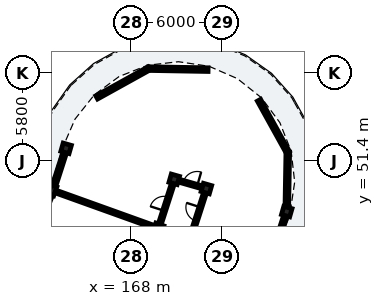
"""IFC4 building model, lengths in metres.
Left out: names, types, materials, properties, quantities, classifications, styles, units other than length and angle.
Written with IfcOpenShell. Run it as: python <this file> out.ifc"""

import sys

from ifc_helpers import new_model, si_unit, direction, frame, frame_2d, origin, origin_2d, place, context, subcontext, project, spatial, rectangle, extrude, element, fill, save


model = new_model("IFC4")
c1 = context("Model", 3, precision=1e-05, world=origin(), true_north=direction((0.0, 1.0)))
c2 = subcontext(c1, "Body", "Model", "MODEL_VIEW")
j1 = project(units=[si_unit("LENGTHUNIT", "METRE"), si_unit("PLANEANGLEUNIT", "RADIAN")], contexts=[c1])
p1 = place(None, origin())
s1 = spatial("IfcSite", under=j1, at=p1, CompositionType="ELEMENT")
p2 = place(p1, origin())
s2 = spatial("IfcBuilding", under=s1, at=p2, CompositionType="ELEMENT")
p3 = place(p2, frame((0.0, 0.0, 15.56)))
s3 = spatial("IfcBuildingStorey", under=s2, at=p3, CompositionType="ELEMENT", Elevation=15.56)
p4 = place(p3, frame((162.835, 49.479, 0.0), z_axis=(0.0, 0.0, 1.0), x_axis=(0.941176015256, -0.337916718003, 0.0)))
e1 = element("IfcColumn", 1, at=p4, inside=s3, PredefinedType="PILASTER", context=c2, shape_type="SweptSolid", body=[
    extrude(rectangle(XDim=0.38, YDim=0.62, at=origin_2d()), origin(), (0.0, 0.0, 1.0), 3.11),
])
for number, where, z_axis, x_axis in (
    (2, (169.8, 46.979, 0.0), (0.0, 0.0, 1.0), (0.941, -0.338, 0.0)),
    (3, (163.728, 52.248, 0.0), (0.0, 0.0, 1.0), (0.961, -0.276, 0.0)),
    (4, (170.841, 50.208, 0.0), (0.0, 0.0, 1.0), (0.961, -0.276, 0.0)),
    (5, (172.956, 49.602, 0.0), (0.0, 0.0, 1.0), (0.961, -0.276, 0.0)),
    (6, (178.243, 48.086, 0.0), (0.0, 0.0, 1.0), (0.961, -0.276, 0.0)),
):
    element("IfcColumn", number, at=place(p3, frame(where, z_axis=z_axis, x_axis=x_axis)), inside=s3, PredefinedType="COLUMN", context=c2, shape_type="SweptSolid", body=[
        extrude(rectangle(XDim=0.56, YDim=0.56, at=origin_2d()), origin(), (0.0, 0.0, 1.0), 3.11),
    ])
p5 = place(p3, frame((161.855, 47.008, 0.0), z_axis=(0.0, 0.0, 1.0), x_axis=(0.368558756085, 0.9296044553, 0.0)))
e7 = element("IfcWall", 7, at=p5, inside=s3, PredefinedType="SOLIDWALL", context=c2, shape_type="SweptSolid", body=[
    extrude(rectangle(XDim=2.499, YDim=0.24, at=frame_2d((1.249, 0.0))), origin(), (0.0, 0.0, 1.0), 2.355),
])
p6 = place(p5, frame((0.76, 0.0, 0.0)))
e8 = element("IfcOpeningElement", 8, at=p6, cuts=e7, PredefinedType="OPENING", context=c2, shape_type="SweptSolid", body=[
    extrude(rectangle(XDim=0.98, YDim=2.12, at=frame_2d((0.49, 1.06))), frame((0.0, 0.13, 0.0), z_axis=(0.0, -1.0, 0.0), x_axis=(1.0, 0.0, 0.0)), (0.0, 0.0, 1.0), 0.26),
])
p7 = place(p3, frame((177.096, 44.529, 0.0), z_axis=(0.0, 0.0, 1.0), x_axis=(0.306949591136, 0.951725773793, 0.0)))
e9 = element("IfcWall", 9, at=p7, inside=s3, PredefinedType="SOLIDWALL", context=c2, shape_type="SweptSolid", body=[
    extrude(rectangle(XDim=3.487, YDim=0.24, at=frame_2d((1.743, 0.0))), origin(), (0.0, 0.0, 1.0), 2.355),
])
p8 = place(p7, frame((1.003, 0.0, 0.55)))
e10 = element("IfcOpeningElement", 10, at=p8, cuts=e9, PredefinedType="OPENING", context=c2, shape_type="SweptSolid", body=[
    extrude(rectangle(XDim=1.48, YDim=1.46, at=frame_2d((0.74, 0.73))), frame((0.0, 0.13, 0.0), z_axis=(0.0, -1.0, 0.0), x_axis=(1.0, 0.0, 0.0)), (0.0, 0.0, 1.0), 0.26),
])
p9 = place(p3, frame((162.884, 49.632, 0.0), z_axis=(0.0, 0.0, 1.0), x_axis=(0.306979942778, 0.951715984279, 0.0)))
e11 = element("IfcWall", 11, at=p9, inside=s3, PredefinedType="SOLIDWALL", context=c2, shape_type="SweptSolid", body=[
    extrude(rectangle(XDim=2.499, YDim=0.24, at=frame_2d((1.25, 0.0))), origin(), (0.0, 0.0, 1.0), 2.355),
])
p10 = place(p9, frame((0.369, 0.0, 0.35)))
e12 = element("IfcOpeningElement", 12, at=p10, cuts=e11, PredefinedType="OPENING", context=c2, shape_type="SweptSolid", body=[
    extrude(rectangle(XDim=1.76, YDim=1.635, at=frame_2d((0.88, 0.817))), frame((0.0, 0.13, 0.0), z_axis=(0.0, -1.0, 0.0), x_axis=(1.0, 0.0, 0.0)), (0.0, 0.0, 1.0), 0.26),
])
p11 = place(p3, frame((165.741, 55.598, 0.0), z_axis=(0.0, 0.0, 1.0), x_axis=(0.874616555828, 0.48481530532, 0.0)))
e13 = element("IfcWall", 13, at=p11, inside=s3, PredefinedType="SOLIDWALL", context=c2, shape_type="SweptSolid", body=[
    extrude(rectangle(XDim=3.908, YDim=0.24, at=frame_2d((1.954, 0.0))), origin(), (0.0, 0.0, 1.0), 2.355),
])
p12 = place(p11, frame((0.979, 0.0, 0.4)))
e14 = element("IfcOpeningElement", 14, at=p12, cuts=e13, PredefinedType="OPENING", context=c2, shape_type="SweptSolid", body=[
    extrude(rectangle(XDim=1.95, YDim=1.78, at=frame_2d((0.975, 0.89))), frame((0.0, 0.13, 0.0), z_axis=(0.0, -1.0, 0.0), x_axis=(1.0, 0.0, 0.0)), (0.0, 0.0, 1.0), 0.26),
])
p13 = place(p3, frame((169.159, 57.493, 0.0), z_axis=(0.0, 0.0, 1.0), x_axis=(0.999847005776, -0.017491856396, 0.0)))
e15 = element("IfcWall", 15, at=p13, inside=s3, PredefinedType="SOLIDWALL", context=c2, shape_type="SweptSolid", body=[
    extrude(rectangle(XDim=3.908, YDim=0.24, at=frame_2d((1.954, 0.0))), origin(), (0.0, 0.0, 1.0), 2.355),
])
p14 = place(p3, frame((176.417, 55.412, 0.0), z_axis=(0.0, 0.0, 1.0), x_axis=(0.48481530532, -0.874616555828, 0.0)))
e16 = element("IfcWall", 16, at=p14, inside=s3, PredefinedType="SOLIDWALL", context=c2, shape_type="SweptSolid", body=[
    extrude(rectangle(XDim=3.908, YDim=0.24, at=frame_2d((1.954, 0.0))), origin(), (0.0, 0.0, 1.0), 2.355),
])
p15 = place(p14, frame((0.979, 0.0, 0.4)))
e17 = element("IfcOpeningElement", 17, at=p15, cuts=e16, PredefinedType="OPENING", context=c2, shape_type="SweptSolid", body=[
    extrude(rectangle(XDim=1.95, YDim=1.78, at=frame_2d((0.975, 0.89))), frame((0.0, 0.13, 0.0), z_axis=(0.0, -1.0, 0.0), x_axis=(1.0, 0.0, 0.0)), (0.0, 0.0, 1.0), 0.26),
])
p16 = place(p3, frame((178.311, 51.993, 0.0), z_axis=(0.0, 0.0, 1.0), x_axis=(-0.017428315893, -0.999848115368, 0.0)))
e18 = element("IfcWall", 18, at=p16, inside=s3, PredefinedType="SOLIDWALL", context=c2, shape_type="SweptSolid", body=[
    extrude(rectangle(XDim=3.908, YDim=0.24, at=frame_2d((1.954, 0.0))), origin(), (0.0, 0.0, 1.0), 2.355),
])
p17 = place(p3, frame((163.212, 49.344, 0.0), z_axis=(0.0, 0.0, 1.0), x_axis=(0.941179890997, -0.337905922978, 0.0)))
e19 = element("IfcWall", 19, at=p17, inside=s3, PredefinedType="PARTITIONING", context=c2, shape_type="SweptSolid", body=[
    extrude(rectangle(XDim=6.6, YDim=0.185, at=frame_2d((3.3, 0.0))), origin(), (0.0, 0.0, 1.0), 2.37),
])
p18 = place(p3, frame((171.978, 46.569, 0.0), z_axis=(0.0, 0.0, 1.0), x_axis=(0.30694495224, 0.951727269912, 0.0)))
e20 = element("IfcWall", 20, at=p18, inside=s3, PredefinedType="PARTITIONING", context=c2, shape_type="SweptSolid", body=[
    extrude(rectangle(XDim=2.837, YDim=0.195, at=frame_2d((1.418, 0.0))), origin(), (0.0, 0.0, 1.0), 2.37),
])
p19 = place(p18, frame((0.944, 0.0, 0.0)))
e21 = element("IfcOpeningElement", 21, at=p19, cuts=e20, PredefinedType="OPENING", context=c2, shape_type="SweptSolid", body=[
    extrude(rectangle(XDim=0.95, YDim=2.13, at=frame_2d((0.475, 1.065))), frame((0.0, 0.107, 0.0), z_axis=(0.0, -1.0, 0.0), x_axis=(1.0, 0.0, 0.0)), (0.0, 0.0, 1.0), 0.215),
])
p20 = place(p3, frame((169.907, 47.312, 0.0), z_axis=(0.0, 0.0, 1.0), x_axis=(0.306883578189, 0.951747061691, 0.0)))
e22 = element("IfcWall", 22, at=p20, inside=s3, PredefinedType="PARTITIONING", context=c2, shape_type="SweptSolid", body=[
    extrude(rectangle(XDim=2.693, YDim=0.195, at=frame_2d((1.346, 0.0))), origin(), (0.0, 0.0, 1.0), 2.37),
])
p21 = place(p20, frame((0.872, 0.0, 0.0)))
e23 = element("IfcOpeningElement", 23, at=p21, cuts=e22, PredefinedType="OPENING", context=c2, shape_type="SweptSolid", body=[
    extrude(rectangle(XDim=0.95, YDim=2.13, at=frame_2d((0.475, 1.065))), frame((0.0, 0.107, 0.0), z_axis=(0.0, -1.0, 0.0), x_axis=(1.0, 0.0, 0.0)), (0.0, 0.0, 1.0), 0.215),
])
p22 = place(p3, frame((170.889, 50.194, 0.0), z_axis=(0.0, 0.0, 1.0), x_axis=(0.961264701934, -0.275626872449, 0.0)))
e24 = element("IfcWall", 24, at=p22, inside=s3, PredefinedType="PARTITIONING", context=c2, shape_type="SweptSolid", body=[
    extrude(rectangle(XDim=2.1, YDim=0.195, at=frame_2d((1.05, 0.0))), origin(), (0.0, 0.0, 1.0), 2.37),
])
p23 = place(p22, frame((0.57, 0.0, 0.0)))
e25 = element("IfcOpeningElement", 25, at=p23, cuts=e24, PredefinedType="OPENING", context=c2, shape_type="SweptSolid", body=[
    extrude(rectangle(XDim=0.95, YDim=2.13, at=frame_2d((0.475, 1.065))), frame((0.0, 0.107, 0.0), z_axis=(0.0, -1.0, 0.0), x_axis=(1.0, 0.0, 0.0)), (0.0, 0.0, 1.0), 0.215),
])
p24 = place(p10, origin())
e26 = element("IfcWindow", 26, at=p24, inside=s3, PartitioningType="SINGLE_PANEL", PredefinedType="WINDOW", context=c2, shape_type="SweptSolid", body=[
    extrude(rectangle(XDim=1.76, YDim=1.635, at=frame_2d((0.88, 0.817))), frame((0.0, 0.03, 0.0), z_axis=(0.0, -1.0, 0.0), x_axis=(1.0, 0.0, 0.0)), (0.0, 0.0, 1.0), 0.06),
])
fill(e12, e26)
p25 = place(p12, origin())
e27 = element("IfcWindow", 27, at=p25, inside=s3, PartitioningType="SINGLE_PANEL", PredefinedType="WINDOW", context=c2, shape_type="SweptSolid", body=[
    extrude(rectangle(XDim=1.95, YDim=1.78, at=frame_2d((0.975, 0.89))), frame((0.0, 0.03, 0.0), z_axis=(0.0, -1.0, 0.0), x_axis=(1.0, 0.0, 0.0)), (0.0, 0.0, 1.0), 0.06),
])
fill(e14, e27)
p26 = place(p15, origin())
e28 = element("IfcWindow", 28, at=p26, inside=s3, PartitioningType="SINGLE_PANEL", PredefinedType="WINDOW", context=c2, shape_type="SweptSolid", body=[
    extrude(rectangle(XDim=1.95, YDim=1.78, at=frame_2d((0.975, 0.89))), frame((0.0, 0.03, 0.0), z_axis=(0.0, -1.0, 0.0), x_axis=(1.0, 0.0, 0.0)), (0.0, 0.0, 1.0), 0.06),
])
fill(e17, e28)
p27 = place(p19, origin())
e29 = element("IfcDoor", 29, at=p27, inside=s3, OperationType="SINGLE_SWING_RIGHT", PredefinedType="DOOR", context=c2, shape_type="SweptSolid", body=[
    extrude(rectangle(XDim=0.95, YDim=2.13, at=frame_2d((0.475, 1.065))), frame((0.0, 0.025, 0.0), z_axis=(0.0, -1.0, 0.0), x_axis=(1.0, 0.0, 0.0)), (0.0, 0.0, 1.0), 0.05),
])
fill(e21, e29)
p28 = place(p21, origin())
e30 = element("IfcDoor", 30, at=p28, inside=s3, OperationType="SINGLE_SWING_LEFT", PredefinedType="DOOR", context=c2, shape_type="SweptSolid", body=[
    extrude(rectangle(XDim=0.95, YDim=2.13, at=frame_2d((0.475, 1.065))), frame((0.0, 0.025, 0.0), z_axis=(0.0, -1.0, 0.0), x_axis=(1.0, 0.0, 0.0)), (0.0, 0.0, 1.0), 0.05),
])
fill(e23, e30)
p29 = place(p23, origin())
e31 = element("IfcDoor", 31, at=p29, inside=s3, OperationType="SINGLE_SWING_RIGHT", PredefinedType="DOOR", context=c2, shape_type="SweptSolid", body=[
    extrude(rectangle(XDim=0.95, YDim=2.13, at=frame_2d((0.475, 1.065))), frame((0.0, 0.025, 0.0), z_axis=(0.0, -1.0, 0.0), x_axis=(1.0, 0.0, 0.0)), (0.0, 0.0, 1.0), 0.05),
])
fill(e25, e31)
save(model, sys.argv[1])
